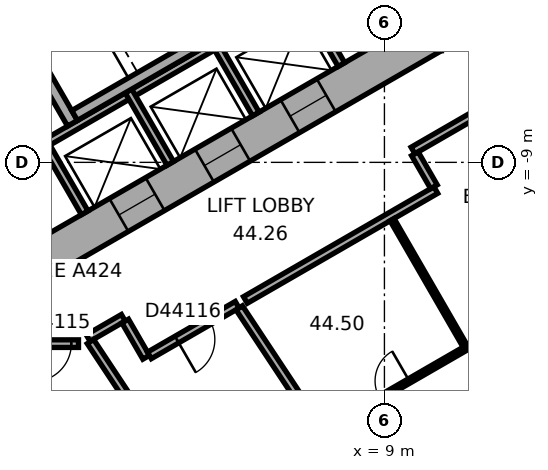
"""IFC4 building model, lengths in metres.
Left out: names, types, materials, properties, quantities, classifications, styles, units other than length and angle.
Written with IfcOpenShell. Run it as: python <this file> out.ifc"""

import sys

from ifc_helpers import new_model, si_unit, direction, frame, frame_2d, origin, place, context, subcontext, project, spatial, rectangle, extrude, element, fill, save


model = new_model("IFC4")
c1 = context("Model", 3, precision=1e-05, world=origin(), true_north=direction((0.0, 1.0)))
c2 = subcontext(c1, "Body", "Model", "MODEL_VIEW")
j1 = project(units=[si_unit("LENGTHUNIT", "METRE"), si_unit("PLANEANGLEUNIT", "RADIAN")], contexts=[c1])
p1 = place(None, origin())
s1 = spatial("IfcSite", under=j1, at=p1, CompositionType="ELEMENT")
p2 = place(p1, origin())
s2 = spatial("IfcBuilding", under=s1, at=p2, CompositionType="ELEMENT")
p3 = place(p2, frame((0.0, 0.0, 179.9)))
s3 = spatial("IfcBuildingStorey", under=s2, at=p3, CompositionType="ELEMENT", Elevation=179.9)
p4 = place(p3, frame((-10.25, -5.629, 0.0), z_axis=(0.0, 0.0, 1.0), x_axis=(0.866022616891, -0.50000482701, 0.0)))
e1 = element("IfcWall", 1, at=p4, inside=s3, PredefinedType="SHEAR", context=c2, shape_type="SweptSolid", body=[
    extrude(rectangle(XDim=12.125, YDim=1.0, at=frame_2d((6.062, 0.0))), origin(), (0.0, 0.0, 1.0), 3.7),
])
p5 = place(p4, frame((6.262, 0.0, 0.0)))
e2 = element("IfcOpeningElement", 2, at=p5, cuts=e1, PredefinedType="OPENING", context=c2, shape_type="SweptSolid", body=[
    extrude(rectangle(XDim=1.5, YDim=2.1, at=frame_2d((0.75, 1.05))), frame((0.0, 0.51, 0.0), z_axis=(0.0, -1.0, 0.0), x_axis=(1.0, 0.0, 0.0)), (0.0, 0.0, 1.0), 1.02),
])
p6 = place(p4, frame((1.712, 0.0, 0.0)))
e3 = element("IfcOpeningElement", 3, at=p6, cuts=e1, PredefinedType="OPENING", context=c2, shape_type="SweptSolid", body=[
    extrude(rectangle(XDim=1.1, YDim=2.1, at=frame_2d((0.55, 1.05))), frame((0.0, 0.51, 0.0), z_axis=(0.0, -1.0, 0.0), x_axis=(1.0, 0.0, 0.0)), (0.0, 0.0, 1.0), 1.02),
])
p7 = place(p4, frame((4.312, 0.0, 0.0)))
e4 = element("IfcOpeningElement", 4, at=p7, cuts=e1, PredefinedType="OPENING", context=c2, shape_type="SweptSolid", body=[
    extrude(rectangle(XDim=1.1, YDim=2.1, at=frame_2d((0.55, 1.05))), frame((0.0, 0.51, 0.0), z_axis=(0.0, -1.0, 0.0), x_axis=(1.0, 0.0, 0.0)), (0.0, 0.0, 1.0), 1.02),
])
p8 = place(p3, frame((-0.25, -11.691, 0.0), z_axis=(0.0, 0.0, 1.0), x_axis=(0.866022616891, 0.50000482701, 0.0)))
e5 = element("IfcWall", 5, at=p8, inside=s3, PredefinedType="SHEAR", context=c2, shape_type="SweptSolid", body=[
    extrude(rectangle(XDim=12.125, YDim=1.0, at=frame_2d((6.062, 0.0))), origin(), (0.0, 0.0, 1.0), 3.7),
])
p9 = place(p8, frame((2.612, 0.0, 0.0)))
e6 = element("IfcOpeningElement", 6, at=p9, cuts=e5, PredefinedType="OPENING", context=c2, shape_type="SweptSolid", body=[
    extrude(rectangle(XDim=1.1, YDim=2.1, at=frame_2d((0.55, 1.05))), frame((0.0, 0.51, 0.0), z_axis=(0.0, -1.0, 0.0), x_axis=(1.0, 0.0, 0.0)), (0.0, 0.0, 1.0), 1.02),
])
p10 = place(p8, frame((5.212, 0.0, 0.0)))
e7 = element("IfcOpeningElement", 7, at=p10, cuts=e5, PredefinedType="OPENING", context=c2, shape_type="SweptSolid", body=[
    extrude(rectangle(XDim=1.1, YDim=2.1, at=frame_2d((0.55, 1.05))), frame((0.0, 0.51, 0.0), z_axis=(0.0, -1.0, 0.0), x_axis=(1.0, 0.0, 0.0)), (0.0, 0.0, 1.0), 1.02),
])
p11 = place(p8, frame((7.812, 0.0, 0.0)))
e8 = element("IfcOpeningElement", 8, at=p11, cuts=e5, PredefinedType="OPENING", context=c2, shape_type="SweptSolid", body=[
    extrude(rectangle(XDim=1.1, YDim=2.1, at=frame_2d((0.55, 1.05))), frame((0.0, 0.51, 0.0), z_axis=(0.0, -1.0, 0.0), x_axis=(1.0, 0.0, 0.0)), (0.0, 0.0, 1.0), 1.02),
])
p12 = place(p3, frame((2.911, -24.156, 0.0), z_axis=(0.0, 0.0, 1.0), x_axis=(0.833882163564, 0.551942512668, 0.0)))
e9 = element("IfcWall", 9, at=p12, inside=s3, PredefinedType="STANDARD", context=c2, shape_type="SweptSolid", body=[
    extrude(rectangle(XDim=20.044, YDim=0.2, at=frame_2d((10.022, 0.0))), origin(), (0.0, 0.0, 1.0), 3.7),
])
p13 = place(p12, frame((1.313, 0.0, 0.9)))
e10 = element("IfcOpeningElement", 10, at=p13, cuts=e9, PredefinedType="OPENING", context=c2, shape_type="SweptSolid", body=[
    extrude(rectangle(XDim=2.4, YDim=2.0, at=frame_2d((1.2, 1.0))), frame((0.0, 0.11, 0.0), z_axis=(0.0, -1.0, 0.0), x_axis=(1.0, 0.0, 0.0)), (0.0, 0.0, 1.0), 0.22),
])
p14 = place(p12, frame((5.067, 0.0, 0.9)))
e11 = element("IfcOpeningElement", 11, at=p14, cuts=e9, PredefinedType="OPENING", context=c2, shape_type="SweptSolid", body=[
    extrude(rectangle(XDim=2.4, YDim=2.0, at=frame_2d((1.2, 1.0))), frame((0.0, 0.11, 0.0), z_axis=(0.0, -1.0, 0.0), x_axis=(1.0, 0.0, 0.0)), (0.0, 0.0, 1.0), 0.22),
])
p15 = place(p12, frame((8.821, 0.0, 0.9)))
e12 = element("IfcOpeningElement", 12, at=p15, cuts=e9, PredefinedType="OPENING", context=c2, shape_type="SweptSolid", body=[
    extrude(rectangle(XDim=2.4, YDim=2.0, at=frame_2d((1.2, 1.0))), frame((0.0, 0.11, 0.0), z_axis=(0.0, -1.0, 0.0), x_axis=(1.0, 0.0, 0.0)), (0.0, 0.0, 1.0), 0.22),
])
p16 = place(p12, frame((12.575, 0.0, 0.9)))
e13 = element("IfcOpeningElement", 13, at=p16, cuts=e9, PredefinedType="OPENING", context=c2, shape_type="SweptSolid", body=[
    extrude(rectangle(XDim=2.4, YDim=2.0, at=frame_2d((1.2, 1.0))), frame((0.0, 0.11, 0.0), z_axis=(0.0, -1.0, 0.0), x_axis=(1.0, 0.0, 0.0)), (0.0, 0.0, 1.0), 0.22),
])
p17 = place(p12, frame((16.329, 0.0, 0.9)))
e14 = element("IfcOpeningElement", 14, at=p17, cuts=e9, PredefinedType="OPENING", context=c2, shape_type="SweptSolid", body=[
    extrude(rectangle(XDim=2.4, YDim=2.0, at=frame_2d((1.2, 1.0))), frame((0.0, 0.11, 0.0), z_axis=(0.0, -1.0, 0.0), x_axis=(1.0, 0.0, 0.0)), (0.0, 0.0, 1.0), 0.22),
])
p18 = place(p3, frame((-0.024, -8.559, 0.0), z_axis=(0.0, 0.0, 1.0), x_axis=(0.866026010844, 0.49999894854, 0.0)))
e15 = element("IfcWall", 15, at=p18, inside=s3, PredefinedType="PARTITIONING", context=c2, shape_type="SweptSolid", body=[
    extrude(rectangle(XDim=8.0, YDim=0.2, at=frame_2d((4.0, 0.0))), origin(), (0.0, 0.0, 1.0), 3.42),
])
for number, where, z_axis, x_axis in (
    (16, (0.013, -8.422, 0.0), (0.0, 0.0, 1.0), (0.5, -0.866, 0.0)),
    (17, (2.264, -7.122, 0.0), (0.0, 0.0, 1.0), (0.5, -0.866, 0.0)),
    (18, (4.516, -5.822, 0.0), (0.0, 0.0, 1.0), (0.5, -0.866, 0.0)),
    (19, (6.768, -4.522, 0.0), (0.0, 0.0, 1.0), (0.5, -0.866, 0.0)),
):
    element("IfcWall", number, at=place(p3, frame(where, z_axis=z_axis, x_axis=x_axis)), inside=s3, PredefinedType="PARTITIONING", context=c2, shape_type="SweptSolid", body=[
        extrude(rectangle(XDim=2.2, YDim=0.2, at=frame_2d((1.1, 0.0))), origin(), (0.0, 0.0, 1.0), 3.42),
    ])
p19 = place(p3, frame((-1.558, -3.902, 0.0), z_axis=(0.0, 0.0, 1.0), x_axis=(0.499977259774, -0.866038532462, 0.0)))
e20 = element("IfcWall", 20, at=p19, inside=s3, PredefinedType="SHEAR", context=c2, shape_type="SweptSolid", body=[
    extrude(rectangle(XDim=4.7, YDim=0.3, at=frame_2d((2.35, 0.0))), origin(), (0.0, 0.0, 1.0), 3.42),
])
p20 = place(p19, frame((0.8, 0.0, 0.0)))
e21 = element("IfcOpeningElement", 21, at=p20, cuts=e20, PredefinedType="OPENING", context=c2, shape_type="SweptSolid", body=[
    extrude(rectangle(XDim=1.2, YDim=2.1, at=frame_2d((0.6, 1.05))), frame((0.0, 0.16, 0.0), z_axis=(0.0, -1.0, 0.0), x_axis=(1.0, 0.0, 0.0)), (0.0, 0.0, 1.0), 0.32),
])
p21 = place(p3, frame((0.847, -7.767, 0.0), z_axis=(0.0, 0.0, 1.0), x_axis=(0.866027801685, 0.499995846692, 0.0)))
e22 = element("IfcWall", 22, at=p21, inside=s3, PredefinedType="SHEAR", context=c2, shape_type="SweptSolid", body=[
    extrude(rectangle(XDim=7.06, YDim=0.3, at=frame_2d((3.53, 0.0))), origin(), (0.0, 0.0, 1.0), 3.42),
])
p22 = place(p3, frame((-0.91, -13.77, 0.0), z_axis=(0.0, 0.0, 1.0), x_axis=(1.0, 0.0, 0.0)))
e23 = element("IfcWall", 23, at=p22, inside=s3, PredefinedType="PARTITIONING", context=c2, shape_type="SweptSolid", body=[
    extrude(rectangle(XDim=1.86, YDim=0.2, at=frame_2d((0.93, 0.0))), origin(), (0.0, 0.0, 1.0), 3.42),
])
p23 = place(p22, frame((0.672, 0.0, 0.0)))
e24 = element("IfcOpeningElement", 24, at=p23, cuts=e23, PredefinedType="OPENING", context=c2, shape_type="SweptSolid", body=[
    extrude(rectangle(XDim=1.0, YDim=2.1, at=frame_2d((0.5, 1.05))), frame((0.0, 0.11, 0.0), z_axis=(0.0, -1.0, 0.0), x_axis=(1.0, 0.0, 0.0)), (0.0, 0.0, 1.0), 0.22),
])
p24 = place(p3, frame((1.204, -13.623, 0.0), z_axis=(0.0, 0.0, 1.0), x_axis=(0.866040989419, 0.499973003918, 0.0)))
e25 = element("IfcWall", 25, at=p24, inside=s3, PredefinedType="PARTITIONING", context=c2, shape_type="SweptSolid", body=[
    extrude(rectangle(XDim=1.068, YDim=0.2, at=frame_2d((0.534, 0.0))), origin(), (0.0, 0.0, 1.0), 3.42),
])
p25 = place(p3, frame((2.179, -13.176, 0.0), z_axis=(0.0, 0.0, 1.0), x_axis=(0.499978356969, -0.866037899034, 0.0)))
e26 = element("IfcWall", 26, at=p25, inside=s3, PredefinedType="PARTITIONING", context=c2, shape_type="SweptSolid", body=[
    extrude(rectangle(XDim=1.101, YDim=0.2, at=frame_2d((0.551, 0.0))), origin(), (0.0, 0.0, 1.0), 3.42),
])
p26 = place(p3, frame((2.816, -14.079, 0.0), z_axis=(0.0, 0.0, 1.0), x_axis=(0.866008705299, 0.50002892151, 0.0)))
e27 = element("IfcWall", 27, at=p26, inside=s3, PredefinedType="PARTITIONING", context=c2, shape_type="SweptSolid", body=[
    extrude(rectangle(XDim=2.666, YDim=0.2, at=frame_2d((1.333, 0.0))), origin(), (0.0, 0.0, 1.0), 3.42),
])
p27 = place(p26, frame((0.833, 0.0, 0.0)))
e28 = element("IfcOpeningElement", 28, at=p27, cuts=e27, PredefinedType="OPENING", context=c2, shape_type="SweptSolid", body=[
    extrude(rectangle(XDim=1.0, YDim=2.1, at=frame_2d((0.5, 1.05))), frame((0.0, 0.11, 0.0), z_axis=(0.0, -1.0, 0.0), x_axis=(1.0, 0.0, 0.0)), (0.0, 0.0, 1.0), 0.22),
])
p28 = place(p3, frame((5.342, -12.621, 0.0), z_axis=(0.0, 0.0, 1.0), x_axis=(0.866024665123, 0.500001279396, 0.0)))
e29 = element("IfcWall", 29, at=p28, inside=s3, PredefinedType="PARTITIONING", context=c2, shape_type="SweptSolid", body=[
    extrude(rectangle(XDim=5.786, YDim=0.2, at=frame_2d((2.893, 0.0))), origin(), (0.0, 0.0, 1.0), 3.42),
])
p29 = place(p3, frame((6.02, -20.899, 0.0), z_axis=(0.0, 0.0, 1.0), x_axis=(-0.551943990108, 0.833881185651, 0.0)))
e30 = element("IfcWall", 30, at=p29, inside=s3, PredefinedType="PARTITIONING", context=c2, shape_type="SweptSolid", body=[
    extrude(rectangle(XDim=8.615, YDim=0.2, at=frame_2d((4.308, 0.0))), origin(), (0.0, 0.0, 1.0), 3.42),
])
p30 = place(p3, frame((9.15, -18.827, 0.0), z_axis=(0.0, 0.0, 1.0), x_axis=(-0.551939801345, 0.833883958169, 0.0)))
e31 = element("IfcWall", 31, at=p30, inside=s3, PredefinedType="PARTITIONING", context=c2, shape_type="SweptSolid", body=[
    extrude(rectangle(XDim=7.192, YDim=0.2, at=frame_2d((3.596, 0.0))), origin(), (0.0, 0.0, 1.0), 2.87),
])
p31 = place(p3, frame((9.202, -10.508, 0.0), z_axis=(0.0, 0.0, 1.0), x_axis=(0.500043961785, -0.866000020948, 0.0)))
e32 = element("IfcWall", 32, at=p31, inside=s3, PredefinedType="PARTITIONING", context=c2, shape_type="SweptSolid", body=[
    extrude(rectangle(XDim=3.9, YDim=0.12, at=frame_2d((1.95, 0.0))), origin(), (0.0, 0.0, 1.0), 3.42),
])
p32 = place(p3, frame((9.752, -8.688, 0.0), z_axis=(0.0, 0.0, 1.0), x_axis=(0.865974105138, 0.500088841337, 0.0)))
e33 = element("IfcWall", 33, at=p32, inside=s3, PredefinedType="PARTITIONING", context=c2, shape_type="SweptSolid", body=[
    extrude(rectangle(XDim=1.961, YDim=0.2, at=frame_2d((0.98, 0.0))), origin(), (0.0, 0.0, 1.0), 3.42),
])
p33 = place(p3, frame((10.302, -9.642, 0.0), z_axis=(0.0, 0.0, 1.0), x_axis=(-0.500074377092, 0.865982457891, 0.0)))
e34 = element("IfcWall", 34, at=p33, inside=s3, PredefinedType="PARTITIONING", context=c2, shape_type="SweptSolid", body=[
    extrude(rectangle(XDim=1.001, YDim=0.2, at=frame_2d((0.5, 0.0))), origin(), (0.0, 0.0, 1.0), 3.42),
])
p34 = place(p3, frame((11.1, -13.915, 0.0), z_axis=(0.0, 0.0, 1.0), x_axis=(-0.866048475386, -0.499960036685, 0.0)))
e35 = element("IfcWall", 35, at=p34, inside=s3, PredefinedType="PARTITIONING", context=c2, shape_type="SweptSolid", body=[
    extrude(rectangle(XDim=4.24, YDim=0.12, at=frame_2d((2.12, 0.0))), origin(), (0.0, 0.0, 1.0), 3.42),
])
p35 = place(p34, frame((1.67, 0.0, 0.0)))
e36 = element("IfcOpeningElement", 36, at=p35, cuts=e35, PredefinedType="OPENING", context=c2, shape_type="SweptSolid", body=[
    extrude(rectangle(XDim=0.9, YDim=2.1, at=frame_2d((0.45, 1.05))), frame((0.0, 0.07, 0.0), z_axis=(0.0, -1.0, 0.0), x_axis=(1.0, 0.0, 0.0)), (0.0, 0.0, 1.0), 0.14),
])
p36 = place(p9, origin())
e37 = element("IfcDoor", 37, at=p36, inside=s3, OperationType="DOUBLE_DOOR_SLIDING", PredefinedType="DOOR", context=c2, shape_type="SweptSolid", body=[
    extrude(rectangle(XDim=1.1, YDim=2.1, at=frame_2d((0.55, 1.05))), frame((0.0, 0.025, 0.0), z_axis=(0.0, -1.0, 0.0), x_axis=(1.0, 0.0, 0.0)), (0.0, 0.0, 1.0), 0.05),
])
fill(e6, e37)
p37 = place(p10, origin())
e38 = element("IfcDoor", 38, at=p37, inside=s3, OperationType="DOUBLE_DOOR_SLIDING", PredefinedType="DOOR", context=c2, shape_type="SweptSolid", body=[
    extrude(rectangle(XDim=1.1, YDim=2.1, at=frame_2d((0.55, 1.05))), frame((0.0, 0.025, 0.0), z_axis=(0.0, -1.0, 0.0), x_axis=(1.0, 0.0, 0.0)), (0.0, 0.0, 1.0), 0.05),
])
fill(e7, e38)
p38 = place(p11, origin())
e39 = element("IfcDoor", 39, at=p38, inside=s3, OperationType="DOUBLE_DOOR_SLIDING", PredefinedType="DOOR", context=c2, shape_type="SweptSolid", body=[
    extrude(rectangle(XDim=1.1, YDim=2.1, at=frame_2d((0.55, 1.05))), frame((0.0, 0.025, 0.0), z_axis=(0.0, -1.0, 0.0), x_axis=(1.0, 0.0, 0.0)), (0.0, 0.0, 1.0), 0.05),
])
fill(e8, e39)
p39 = place(p23, origin())
e40 = element("IfcDoor", 40, at=p39, inside=s3, OperationType="SINGLE_SWING_LEFT", PredefinedType="DOOR", context=c2, shape_type="SweptSolid", body=[
    extrude(rectangle(XDim=1.0, YDim=2.1, at=frame_2d((0.5, 1.05))), frame((0.0, 0.025, 0.0), z_axis=(0.0, -1.0, 0.0), x_axis=(1.0, 0.0, 0.0)), (0.0, 0.0, 1.0), 0.05),
])
fill(e24, e40)
p40 = place(p27, origin())
e41 = element("IfcDoor", 41, at=p40, inside=s3, OperationType="SINGLE_SWING_LEFT", PredefinedType="DOOR", context=c2, shape_type="SweptSolid", body=[
    extrude(rectangle(XDim=1.0, YDim=2.1, at=frame_2d((0.5, 1.05))), frame((0.0, 0.025, 0.0), z_axis=(0.0, -1.0, 0.0), x_axis=(1.0, 0.0, 0.0)), (0.0, 0.0, 1.0), 0.05),
])
fill(e28, e41)
p41 = place(p35, origin())
e42 = element("IfcDoor", 42, at=p41, inside=s3, OperationType="SINGLE_SWING_LEFT", PredefinedType="DOOR", context=c2, shape_type="SweptSolid", body=[
    extrude(rectangle(XDim=0.9, YDim=2.1, at=frame_2d((0.45, 1.05))), frame((0.0, 0.025, 0.0), z_axis=(0.0, -1.0, 0.0), x_axis=(1.0, 0.0, 0.0)), (0.0, 0.0, 1.0), 0.05),
])
fill(e36, e42)
save(model, sys.argv[1])
